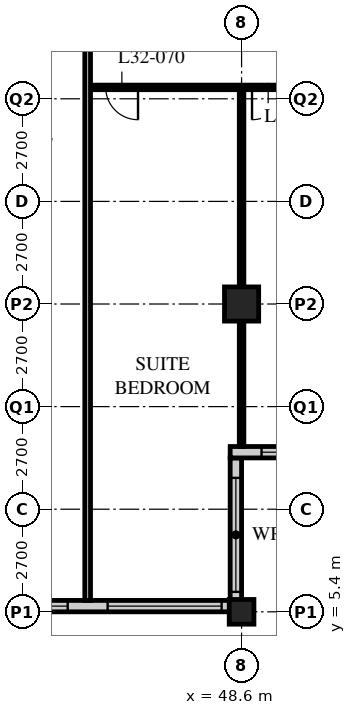
"""IFC4 building model, lengths in metres.
Left out: names, types, materials, properties, quantities, classifications, styles, units other than length and angle.
Written with IfcOpenShell. Run it as: python <this file> out.ifc"""

import sys

from ifc_helpers import new_model, si_unit, direction, frame, frame_2d, origin, origin_2d, place, context, subcontext, project, spatial, rectangle, hollow_rectangle, extrude, element, fill, save


model = new_model("IFC4")
c1 = context("Model", 3, precision=1e-05, world=origin(), true_north=direction((0.0, 1.0)))
c2 = subcontext(c1, "Body", "Model", "MODEL_VIEW")
j1 = project(units=[si_unit("LENGTHUNIT", "METRE"), si_unit("PLANEANGLEUNIT", "RADIAN")], contexts=[c1])
p1 = place(None, origin())
s1 = spatial("IfcSite", under=j1, at=p1, CompositionType="ELEMENT")
p2 = place(p1, origin())
s2 = spatial("IfcBuilding", under=s1, at=p2, CompositionType="ELEMENT")
p3 = place(p2, frame((0.0, 0.0, 127.2)))
s3 = spatial("IfcBuildingStorey", under=s2, at=p3, CompositionType="ELEMENT", Elevation=127.2)
p4 = place(p3, frame((48.6, 5.4, 0.0), z_axis=(0.0, 0.0, 1.0), x_axis=(1.0, 0.0, 0.0)))
e1 = element("IfcColumn", 1, at=p4, inside=s3, PredefinedType="COLUMN", context=c2, shape_type="SweptSolid", body=[
    extrude(hollow_rectangle(XDim=0.65, YDim=0.65, WallThickness=0.055, at=origin_2d()), origin(), (0.0, 0.0, 1.0), 3.4),
])
p5 = place(p3, frame((48.6, 13.5, 0.0), z_axis=(0.0, 0.0, 1.0), x_axis=(1.0, 0.0, 0.0)))
e2 = element("IfcColumn", 2, at=p5, inside=s3, PredefinedType="COLUMN", context=c2, shape_type="SweptSolid", body=[
    extrude(hollow_rectangle(XDim=0.9, YDim=0.9, WallThickness=0.09, at=origin_2d()), origin(), (0.0, 0.0, 1.0), 3.4),
])
p6 = place(p3, frame((8.4, 5.55, 0.0), z_axis=(0.0, 0.0, 1.0), x_axis=(1.0, 0.0, 0.0)))
e3 = element("IfcWall", 3, at=p6, inside=s3, PredefinedType="SOLIDWALL", context=c2, shape_type="SweptSolid", body=[
    extrude(rectangle(XDim=40.2, YDim=0.3, at=frame_2d((20.1, 0.0))), origin(), (0.0, 0.0, 1.0), 3.19),
])
p7 = place(p6, frame((0.225, 0.0, 0.9)))
e4 = element("IfcOpeningElement", 4, at=p7, cuts=e3, PredefinedType="OPENING", context=c2, shape_type="SweptSolid", body=[
    extrude(rectangle(XDim=3.0, YDim=2.0, at=frame_2d((1.5, 1.0))), frame((0.0, 0.16, 0.0), z_axis=(0.0, -1.0, 0.0), x_axis=(1.0, 0.0, 0.0)), (0.0, 0.0, 1.0), 0.32),
])
p8 = place(p6, frame((4.275, 0.0, 0.9)))
e5 = element("IfcOpeningElement", 5, at=p8, cuts=e3, PredefinedType="OPENING", context=c2, shape_type="SweptSolid", body=[
    extrude(rectangle(XDim=3.0, YDim=2.0, at=frame_2d((1.5, 1.0))), frame((0.0, 0.16, 0.0), z_axis=(0.0, -1.0, 0.0), x_axis=(1.0, 0.0, 0.0)), (0.0, 0.0, 1.0), 0.32),
])
p9 = place(p6, frame((8.325, 0.0, 0.9)))
e6 = element("IfcOpeningElement", 6, at=p9, cuts=e3, PredefinedType="OPENING", context=c2, shape_type="SweptSolid", body=[
    extrude(rectangle(XDim=3.0, YDim=2.0, at=frame_2d((1.5, 1.0))), frame((0.0, 0.16, 0.0), z_axis=(0.0, -1.0, 0.0), x_axis=(1.0, 0.0, 0.0)), (0.0, 0.0, 1.0), 0.32),
])
p10 = place(p6, frame((12.375, 0.0, 0.9)))
e7 = element("IfcOpeningElement", 7, at=p10, cuts=e3, PredefinedType="OPENING", context=c2, shape_type="SweptSolid", body=[
    extrude(rectangle(XDim=3.0, YDim=2.0, at=frame_2d((1.5, 1.0))), frame((0.0, 0.16, 0.0), z_axis=(0.0, -1.0, 0.0), x_axis=(1.0, 0.0, 0.0)), (0.0, 0.0, 1.0), 0.32),
])
p11 = place(p6, frame((16.425, 0.0, 0.9)))
e8 = element("IfcOpeningElement", 8, at=p11, cuts=e3, PredefinedType="OPENING", context=c2, shape_type="SweptSolid", body=[
    extrude(rectangle(XDim=3.0, YDim=2.0, at=frame_2d((1.5, 1.0))), frame((0.0, 0.16, 0.0), z_axis=(0.0, -1.0, 0.0), x_axis=(1.0, 0.0, 0.0)), (0.0, 0.0, 1.0), 0.32),
])
p12 = place(p6, frame((20.475, 0.0, 0.9)))
e9 = element("IfcOpeningElement", 9, at=p12, cuts=e3, PredefinedType="OPENING", context=c2, shape_type="SweptSolid", body=[
    extrude(rectangle(XDim=3.0, YDim=2.0, at=frame_2d((1.5, 1.0))), frame((0.0, 0.16, 0.0), z_axis=(0.0, -1.0, 0.0), x_axis=(1.0, 0.0, 0.0)), (0.0, 0.0, 1.0), 0.32),
])
p13 = place(p6, frame((24.525, 0.0, 0.9)))
e10 = element("IfcOpeningElement", 10, at=p13, cuts=e3, PredefinedType="OPENING", context=c2, shape_type="SweptSolid", body=[
    extrude(rectangle(XDim=3.0, YDim=2.0, at=frame_2d((1.5, 1.0))), frame((0.0, 0.16, 0.0), z_axis=(0.0, -1.0, 0.0), x_axis=(1.0, 0.0, 0.0)), (0.0, 0.0, 1.0), 0.32),
])
p14 = place(p6, frame((28.575, 0.0, 0.9)))
e11 = element("IfcOpeningElement", 11, at=p14, cuts=e3, PredefinedType="OPENING", context=c2, shape_type="SweptSolid", body=[
    extrude(rectangle(XDim=3.0, YDim=2.0, at=frame_2d((1.5, 1.0))), frame((0.0, 0.16, 0.0), z_axis=(0.0, -1.0, 0.0), x_axis=(1.0, 0.0, 0.0)), (0.0, 0.0, 1.0), 0.32),
])
p15 = place(p6, frame((32.625, 0.0, 0.9)))
e12 = element("IfcOpeningElement", 12, at=p15, cuts=e3, PredefinedType="OPENING", context=c2, shape_type="SweptSolid", body=[
    extrude(rectangle(XDim=3.0, YDim=2.0, at=frame_2d((1.5, 1.0))), frame((0.0, 0.16, 0.0), z_axis=(0.0, -1.0, 0.0), x_axis=(1.0, 0.0, 0.0)), (0.0, 0.0, 1.0), 0.32),
])
p16 = place(p6, frame((36.675, 0.0, 0.9)))
e13 = element("IfcOpeningElement", 13, at=p16, cuts=e3, PredefinedType="OPENING", context=c2, shape_type="SweptSolid", body=[
    extrude(rectangle(XDim=3.0, YDim=2.0, at=frame_2d((1.5, 1.0))), frame((0.0, 0.16, 0.0), z_axis=(0.0, -1.0, 0.0), x_axis=(1.0, 0.0, 0.0)), (0.0, 0.0, 1.0), 0.32),
])
p17 = place(p3, frame((48.45, 5.7, 0.0), z_axis=(0.0, 0.0, 1.0), x_axis=(0.0, 1.0, 0.0)))
e14 = element("IfcWall", 14, at=p17, inside=s3, PredefinedType="SOLIDWALL", context=c2, shape_type="SweptSolid", body=[
    extrude(rectangle(XDim=3.75, YDim=0.3, at=frame_2d((1.875, 0.0))), origin(), (0.0, 0.0, 1.0), 3.19),
])
p18 = place(p17, frame((0.225, 0.0, 0.9)))
e15 = element("IfcOpeningElement", 15, at=p18, cuts=e14, PredefinedType="OPENING", context=c2, shape_type="SweptSolid", body=[
    extrude(rectangle(XDim=3.0, YDim=1.5, at=frame_2d((1.5, 0.75))), frame((0.0, 0.16, 0.0), z_axis=(0.0, -1.0, 0.0), x_axis=(1.0, 0.0, 0.0)), (0.0, 0.0, 1.0), 0.32),
])
p19 = place(p3, frame((48.3, 9.6, 0.0), z_axis=(0.0, 0.0, 1.0), x_axis=(1.0, 0.0, 0.0)))
e16 = element("IfcWall", 16, at=p19, inside=s3, PredefinedType="SOLIDWALL", context=c2, shape_type="SweptSolid", body=[
    extrude(rectangle(XDim=4.35, YDim=0.3, at=frame_2d((2.175, 0.0))), origin(), (0.0, 0.0, 1.0), 3.19),
])
p20 = place(p19, frame((0.825, 0.0, 0.9)))
e17 = element("IfcOpeningElement", 17, at=p20, cuts=e16, PredefinedType="OPENING", context=c2, shape_type="SweptSolid", body=[
    extrude(rectangle(XDim=3.0, YDim=1.5, at=frame_2d((1.5, 0.75))), frame((0.0, 0.16, 0.0), z_axis=(0.0, -1.0, 0.0), x_axis=(1.0, 0.0, 0.0)), (0.0, 0.0, 1.0), 0.32),
])
p21 = place(p3, frame((44.55, 19.2, 0.0), z_axis=(0.0, 0.0, 1.0), x_axis=(1.0, 0.0, 0.0)))
e18 = element("IfcWall", 18, at=p21, inside=s3, PredefinedType="PARTITIONING", context=c2, shape_type="SweptSolid", body=[
    extrude(rectangle(XDim=8.05, YDim=0.12, at=frame_2d((4.025, 0.0))), origin(), (0.0, 0.0, 1.0), 3.19),
])
p22 = place(p21, frame((0.475, 0.0, 0.0)))
e19 = element("IfcOpeningElement", 19, at=p22, cuts=e18, PredefinedType="OPENING", context=c2, shape_type="SweptSolid", body=[
    extrude(rectangle(XDim=0.85, YDim=2.1, at=frame_2d((0.425, 1.05))), frame((0.0, 0.07, 0.0), z_axis=(0.0, -1.0, 0.0), x_axis=(1.0, 0.0, 0.0)), (0.0, 0.0, 1.0), 0.14),
])
p23 = place(p21, frame((4.325, 0.0, 0.0)))
e20 = element("IfcOpeningElement", 20, at=p23, cuts=e18, PredefinedType="OPENING", context=c2, shape_type="SweptSolid", body=[
    extrude(rectangle(XDim=0.85, YDim=2.1, at=frame_2d((0.425, 1.05))), frame((0.0, 0.07, 0.0), z_axis=(0.0, -1.0, 0.0), x_axis=(1.0, 0.0, 0.0)), (0.0, 0.0, 1.0), 0.14),
])
p24 = place(p3, frame((48.6, 19.2, 0.0), z_axis=(0.0, 0.0, 1.0), x_axis=(0.0, -1.0, 0.0)))
e21 = element("IfcWall", 21, at=p24, inside=s3, PredefinedType="PARTITIONING", context=c2, shape_type="SweptSolid", body=[
    extrude(rectangle(XDim=9.45, YDim=0.12, at=frame_2d((4.725, 0.0))), origin(), (0.0, 0.0, 1.0), 2.578),
])
p25 = place(p3, frame((44.55, 21.6, 0.0), z_axis=(0.0, 0.0, 1.0), x_axis=(0.0, -1.0, 0.0)))
e22 = element("IfcWall", 22, at=p25, inside=s3, PredefinedType="PARTITIONING", context=c2, shape_type="SweptSolid", body=[
    extrude(rectangle(XDim=15.9, YDim=0.15, at=frame_2d((7.95, 0.0))), origin(), (0.0, 0.0, 1.0), 3.19),
])
p26 = place(p15, origin())
e23 = element("IfcWindow", 23, at=p26, inside=s3, PartitioningType="SINGLE_PANEL", PredefinedType="WINDOW", context=c2, shape_type="SweptSolid", body=[
    extrude(rectangle(XDim=3.0, YDim=2.0, at=frame_2d((1.5, 1.0))), frame((0.0, 0.03, 0.0), z_axis=(0.0, -1.0, 0.0), x_axis=(1.0, 0.0, 0.0)), (0.0, 0.0, 1.0), 0.06),
])
fill(e12, e23)
p27 = place(p16, origin())
e24 = element("IfcWindow", 24, at=p27, inside=s3, PartitioningType="SINGLE_PANEL", PredefinedType="WINDOW", context=c2, shape_type="SweptSolid", body=[
    extrude(rectangle(XDim=3.0, YDim=2.0, at=frame_2d((1.5, 1.0))), frame((0.0, 0.03, 0.0), z_axis=(0.0, -1.0, 0.0), x_axis=(1.0, 0.0, 0.0)), (0.0, 0.0, 1.0), 0.06),
])
fill(e13, e24)
p28 = place(p18, origin())
e25 = element("IfcWindow", 25, at=p28, inside=s3, PartitioningType="SINGLE_PANEL", PredefinedType="WINDOW", context=c2, shape_type="SweptSolid", body=[
    extrude(rectangle(XDim=3.0, YDim=1.5, at=frame_2d((1.5, 0.75))), frame((0.0, 0.03, 0.0), z_axis=(0.0, -1.0, 0.0), x_axis=(1.0, 0.0, 0.0)), (0.0, 0.0, 1.0), 0.06),
])
fill(e15, e25)
p29 = place(p20, origin())
e26 = element("IfcWindow", 26, at=p29, inside=s3, PartitioningType="SINGLE_PANEL", PredefinedType="WINDOW", context=c2, shape_type="SweptSolid", body=[
    extrude(rectangle(XDim=3.0, YDim=1.5, at=frame_2d((1.5, 0.75))), frame((0.0, 0.03, 0.0), z_axis=(0.0, -1.0, 0.0), x_axis=(1.0, 0.0, 0.0)), (0.0, 0.0, 1.0), 0.06),
])
fill(e17, e26)
p30 = place(p22, origin())
e27 = element("IfcDoor", 27, at=p30, inside=s3, OperationType="SINGLE_SWING_LEFT", PredefinedType="DOOR", context=c2, shape_type="SweptSolid", body=[
    extrude(rectangle(XDim=0.85, YDim=2.1, at=frame_2d((0.425, 1.05))), frame((0.0, 0.025, 0.0), z_axis=(0.0, -1.0, 0.0), x_axis=(1.0, 0.0, 0.0)), (0.0, 0.0, 1.0), 0.05),
])
fill(e19, e27)
p31 = place(p23, origin())
e28 = element("IfcDoor", 28, at=p31, inside=s3, OperationType="SINGLE_SWING_RIGHT", PredefinedType="DOOR", context=c2, shape_type="SweptSolid", body=[
    extrude(rectangle(XDim=0.85, YDim=2.1, at=frame_2d((0.425, 1.05))), frame((0.0, 0.025, 0.0), z_axis=(0.0, -1.0, 0.0), x_axis=(1.0, 0.0, 0.0)), (0.0, 0.0, 1.0), 0.05),
])
fill(e20, e28)
save(model, sys.argv[1])
